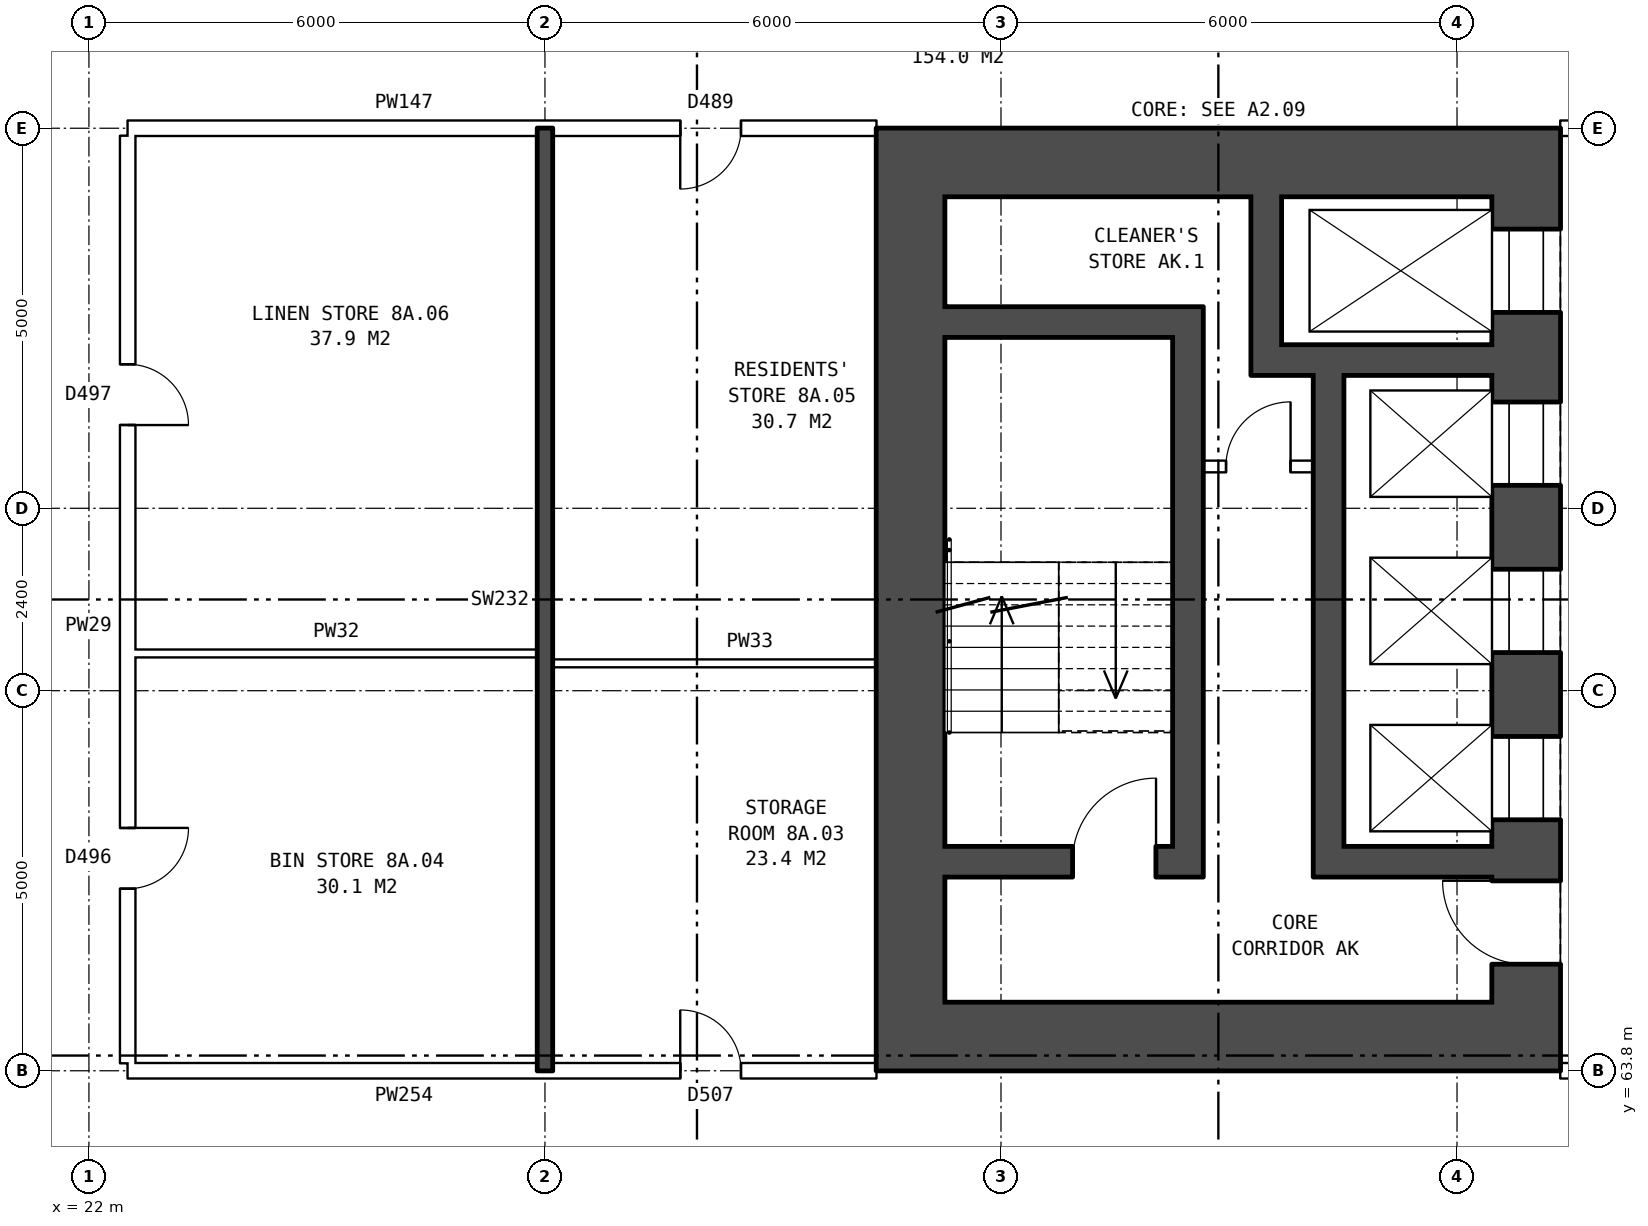
"""IFC4 building model, lengths in metres.
Left out: names, types, materials, properties, quantities, classifications, styles, units other than length and angle.
Written with IfcOpenShell. Run it as: python <this file> out.ifc"""

import sys

from ifc_helpers import new_model, si_unit, direction, frame, frame_2d, origin, place, context, subcontext, project, spatial, rectangle, extrude, element, fill, save


model = new_model("IFC4")
c1 = context("Model", 3, precision=1e-05, world=origin(), true_north=direction((0.0, 1.0)))
c2 = subcontext(c1, "Body", "Model", "MODEL_VIEW")
j1 = project(units=[si_unit("LENGTHUNIT", "METRE"), si_unit("PLANEANGLEUNIT", "RADIAN")], contexts=[c1])
p1 = place(None, origin())
s1 = spatial("IfcSite", under=j1, at=p1, CompositionType="ELEMENT")
p2 = place(p1, origin())
s2 = spatial("IfcBuilding", under=s1, at=p2, CompositionType="ELEMENT")
p3 = place(p2, frame((0.0, 0.0, 31.9)))
s3 = spatial("IfcBuildingStorey", under=s2, at=p3, CompositionType="ELEMENT", Elevation=31.9)
p4 = place(p3, frame((40.91, 75.3, 0.0), z_axis=(0.0, 0.0, 1.0), x_axis=(0.0, -1.0, 0.0)))
e1 = element("IfcWall", 1, at=p4, inside=s3, PredefinedType="SHEAR", context=c2, shape_type="SweptSolid", body=[
    extrude(rectangle(XDim=10.6, YDim=0.9, at=frame_2d((5.3, 0.0))), origin(), (0.0, 0.0, 1.0), 2.85),
])
p5 = place(p4, frame((0.425, 0.0, 0.0)))
e2 = element("IfcOpeningElement", 2, at=p5, cuts=e1, PredefinedType="OPENING", context=c2, shape_type="SweptSolid", body=[
    extrude(rectangle(XDim=1.1, YDim=2.1, at=frame_2d((0.55, 1.05))), frame((0.0, 0.46, 0.0), z_axis=(0.0, -1.0, 0.0), x_axis=(1.0, 0.0, 0.0)), (0.0, 0.0, 1.0), 0.92),
])
p6 = place(p4, frame((2.7, 0.0, 0.0)))
e3 = element("IfcOpeningElement", 3, at=p6, cuts=e1, PredefinedType="OPENING", context=c2, shape_type="SweptSolid", body=[
    extrude(rectangle(XDim=1.1, YDim=2.1, at=frame_2d((0.55, 1.05))), frame((0.0, 0.46, 0.0), z_axis=(0.0, -1.0, 0.0), x_axis=(1.0, 0.0, 0.0)), (0.0, 0.0, 1.0), 0.92),
])
p7 = place(p4, frame((4.9, 0.0, 0.0)))
e4 = element("IfcOpeningElement", 4, at=p7, cuts=e1, PredefinedType="OPENING", context=c2, shape_type="SweptSolid", body=[
    extrude(rectangle(XDim=1.1, YDim=2.1, at=frame_2d((0.55, 1.05))), frame((0.0, 0.46, 0.0), z_axis=(0.0, -1.0, 0.0), x_axis=(1.0, 0.0, 0.0)), (0.0, 0.0, 1.0), 0.92),
])
p8 = place(p4, frame((7.1, 0.0, 0.0)))
e5 = element("IfcOpeningElement", 5, at=p8, cuts=e1, PredefinedType="OPENING", context=c2, shape_type="SweptSolid", body=[
    extrude(rectangle(XDim=1.1, YDim=2.1, at=frame_2d((0.55, 1.05))), frame((0.0, 0.46, 0.0), z_axis=(0.0, -1.0, 0.0), x_axis=(1.0, 0.0, 0.0)), (0.0, 0.0, 1.0), 0.92),
])
p9 = place(p4, frame((9.0, 0.0, 0.0)))
e6 = element("IfcOpeningElement", 6, at=p9, cuts=e1, PredefinedType="OPENING", context=c2, shape_type="SweptSolid", body=[
    extrude(rectangle(XDim=1.1, YDim=2.1, at=frame_2d((0.55, 1.05))), frame((0.0, 0.46, 0.0), z_axis=(0.0, -1.0, 0.0), x_axis=(1.0, 0.0, 0.0)), (0.0, 0.0, 1.0), 0.92),
])
p10 = place(p3, frame((32.81, 75.3, 0.0), z_axis=(0.0, 0.0, 1.0), x_axis=(0.0, -1.0, 0.0)))
e7 = element("IfcWall", 7, at=p10, inside=s3, PredefinedType="SHEAR", context=c2, shape_type="SweptSolid", body=[
    extrude(rectangle(XDim=10.6, YDim=0.9, at=frame_2d((5.3, 0.0))), origin(), (0.0, 0.0, 1.0), 2.85),
])
for number, where, z_axis, x_axis in (
    (8, (41.36, 75.75, 0.0), (0.0, 0.0, 1.0), (-1.0, 0.0, 0.0)),
    (9, (41.36, 64.25, 0.0), (0.0, 0.0, 1.0), (-1.0, 0.0, 0.0)),
):
    element("IfcWall", number, at=place(p3, frame(where, z_axis=z_axis, x_axis=x_axis)), inside=s3, PredefinedType="SHEAR", context=c2, shape_type="SweptSolid", body=[
        extrude(rectangle(XDim=9.0, YDim=0.9, at=frame_2d((4.5, 0.0))), origin(), (0.0, 0.0, 1.0), 2.85),
    ])
p11 = place(p3, frame((36.26, 73.65, 0.0), z_axis=(0.0, 0.0, 1.0), x_axis=(-1.0, 0.0, 0.0)))
e10 = element("IfcWall", 10, at=p11, inside=s3, PredefinedType="SHEAR", context=c2, shape_type="SweptSolid", body=[
    extrude(rectangle(XDim=3.0, YDim=0.4, at=frame_2d((1.5, 0.0))), origin(), (0.0, 0.0, 1.0), 2.85),
])
p12 = place(p3, frame((40.46, 73.15, 0.0), z_axis=(0.0, 0.0, 1.0), x_axis=(-1.0, 0.0, 0.0)))
e11 = element("IfcWall", 11, at=p12, inside=s3, PredefinedType="SHEAR", context=c2, shape_type="SweptSolid", body=[
    extrude(rectangle(XDim=3.17, YDim=0.4, at=frame_2d((1.585, 0.0))), origin(), (0.0, 0.0, 1.0), 2.85),
])
p13 = place(p3, frame((38.11, 71.75, 0.0), z_axis=(0.0, 0.0, 1.0), x_axis=(-1.0, 0.0, 0.0)))
e12 = element("IfcWall", 12, at=p13, inside=s3, PredefinedType="PARTITIONING", context=c2, shape_type="SweptSolid", body=[
    extrude(rectangle(XDim=1.45, YDim=0.15, at=frame_2d((0.725, 0.0))), origin(), (0.0, 0.0, 1.0), 2.85),
])
p14 = place(p13, frame((0.3, 0.0, 0.0)))
e13 = element("IfcOpeningElement", 13, at=p14, cuts=e12, PredefinedType="OPENING", context=c2, shape_type="SweptSolid", body=[
    extrude(rectangle(XDim=0.85, YDim=2.1, at=frame_2d((0.425, 1.05))), frame((0.0, 0.085, 0.0), z_axis=(0.0, -1.0, 0.0), x_axis=(1.0, 0.0, 0.0)), (0.0, 0.0, 1.0), 0.17),
])
p15 = place(p3, frame((40.46, 66.55, 0.0), z_axis=(0.0, 0.0, 1.0), x_axis=(-1.0, 0.0, 0.0)))
e14 = element("IfcWall", 14, at=p15, inside=s3, PredefinedType="SHEAR", context=c2, shape_type="SweptSolid", body=[
    extrude(rectangle(XDim=1.95, YDim=0.4, at=frame_2d((0.975, 0.0))), origin(), (0.0, 0.0, 1.0), 2.85),
])
p16 = place(p3, frame((36.26, 66.55, 0.0), z_axis=(0.0, 0.0, 1.0), x_axis=(-1.0, 0.0, 0.0)))
e15 = element("IfcWall", 15, at=p16, inside=s3, PredefinedType="SHEAR", context=c2, shape_type="SweptSolid", body=[
    extrude(rectangle(XDim=3.0, YDim=0.4, at=frame_2d((1.5, 0.0))), origin(), (0.0, 0.0, 1.0), 2.85),
])
p17 = place(p16, frame((0.22, 0.0, 0.0)))
e16 = element("IfcOpeningElement", 16, at=p17, cuts=e15, PredefinedType="OPENING", context=c2, shape_type="SweptSolid", body=[
    extrude(rectangle(XDim=1.1, YDim=2.1, at=frame_2d((0.55, 1.05))), frame((0.0, 0.21, 0.0), z_axis=(0.0, -1.0, 0.0), x_axis=(1.0, 0.0, 0.0)), (0.0, 0.0, 1.0), 0.42),
])
p18 = place(p3, frame((38.31, 72.95, 0.0), z_axis=(0.0, 0.0, 1.0), x_axis=(0.0, -1.0, 0.0)))
e17 = element("IfcWall", 17, at=p18, inside=s3, PredefinedType="SHEAR", context=c2, shape_type="SweptSolid", body=[
    extrude(rectangle(XDim=6.6, YDim=0.4, at=frame_2d((3.3, 0.0))), origin(), (0.0, 0.0, 1.0), 2.85),
])
p19 = place(p3, frame((37.49, 75.3, 0.0), z_axis=(0.0, 0.0, 1.0), x_axis=(0.0, -1.0, 0.0)))
e18 = element("IfcWall", 18, at=p19, inside=s3, PredefinedType="SHEAR", context=c2, shape_type="SweptSolid", body=[
    extrude(rectangle(XDim=1.95, YDim=0.4, at=frame_2d((0.975, 0.0))), origin(), (0.0, 0.0, 1.0), 2.85),
])
p20 = place(p3, frame((36.46, 73.85, 0.0), z_axis=(0.0, 0.0, 1.0), x_axis=(0.0, -1.0, 0.0)))
e19 = element("IfcWall", 19, at=p20, inside=s3, PredefinedType="SHEAR", context=c2, shape_type="SweptSolid", body=[
    extrude(rectangle(XDim=7.5, YDim=0.4, at=frame_2d((3.75, 0.0))), origin(), (0.0, 0.0, 1.0), 2.85),
])
p21 = place(p3, frame((22.51, 63.8, 0.0), z_axis=(0.0, 0.0, 1.0), x_axis=(1.0, 0.0, 0.0)))
e20 = element("IfcWall", 20, at=p21, inside=s3, PredefinedType="PARTITIONING", context=c2, shape_type="SweptSolid", body=[
    extrude(rectangle(XDim=9.85, YDim=0.2, at=frame_2d((4.925, 0.0))), origin(), (0.0, 0.0, 1.0), 2.85),
])
p22 = place(p21, frame((7.27, 0.0, 0.0)))
e21 = element("IfcOpeningElement", 21, at=p22, cuts=e20, PredefinedType="OPENING", context=c2, shape_type="SweptSolid", body=[
    extrude(rectangle(XDim=0.8, YDim=2.1, at=frame_2d((0.4, 1.05))), frame((0.0, 0.11, 0.0), z_axis=(0.0, -1.0, 0.0), x_axis=(1.0, 0.0, 0.0)), (0.0, 0.0, 1.0), 0.22),
])
p23 = place(p3, frame((41.36, 63.8, 0.0), z_axis=(0.0, 0.0, 1.0), x_axis=(1.0, 0.0, 0.0)))
e22 = element("IfcWall", 22, at=p23, inside=s3, PredefinedType="PARTITIONING", context=c2, shape_type="SweptSolid", body=[
    extrude(rectangle(XDim=3.0, YDim=0.2, at=frame_2d((1.5, 0.0))), origin(), (0.0, 0.0, 1.0), 2.85),
])
p24 = place(p23, frame((1.0, 0.0, 0.0)))
e23 = element("IfcOpeningElement", 23, at=p24, cuts=e22, PredefinedType="OPENING", context=c2, shape_type="SweptSolid", body=[
    extrude(rectangle(XDim=1.0, YDim=2.1, at=frame_2d((0.5, 1.05))), frame((0.0, 0.11, 0.0), z_axis=(0.0, -1.0, 0.0), x_axis=(1.0, 0.0, 0.0)), (0.0, 0.0, 1.0), 0.22),
])
p25 = place(p3, frame((28.1, 69.16, 0.0), z_axis=(0.0, 0.0, 1.0), x_axis=(1.0, 0.0, 0.0)))
e24 = element("IfcWall", 24, at=p25, inside=s3, PredefinedType="PARTITIONING", context=c2, shape_type="SweptSolid", body=[
    extrude(rectangle(XDim=4.26, YDim=0.1, at=frame_2d((2.13, 0.0))), origin(), (0.0, 0.0, 1.0), 2.85),
])
p26 = place(p3, frame((22.61, 69.29, 0.0), z_axis=(0.0, 0.0, 1.0), x_axis=(1.0, 0.0, 0.0)))
e25 = element("IfcWall", 25, at=p26, inside=s3, PredefinedType="PARTITIONING", context=c2, shape_type="SweptSolid", body=[
    extrude(rectangle(XDim=5.29, YDim=0.1, at=frame_2d((2.645, 0.0))), origin(), (0.0, 0.0, 1.0), 2.85),
])
p27 = place(p3, frame((22.51, 76.2, 0.0), z_axis=(0.0, 0.0, 1.0), x_axis=(1.0, 0.0, 0.0)))
e26 = element("IfcWall", 26, at=p27, inside=s3, PredefinedType="PARTITIONING", context=c2, shape_type="SweptSolid", body=[
    extrude(rectangle(XDim=9.85, YDim=0.2, at=frame_2d((4.925, 0.0))), origin(), (0.0, 0.0, 1.0), 2.85),
])
p28 = place(p27, frame((7.27, 0.0, 0.0)))
e27 = element("IfcOpeningElement", 27, at=p28, cuts=e26, PredefinedType="OPENING", context=c2, shape_type="SweptSolid", body=[
    extrude(rectangle(XDim=0.8, YDim=2.1, at=frame_2d((0.4, 1.05))), frame((0.0, 0.11, 0.0), z_axis=(0.0, -1.0, 0.0), x_axis=(1.0, 0.0, 0.0)), (0.0, 0.0, 1.0), 0.22),
])
p29 = place(p3, frame((41.36, 76.2, 0.0), z_axis=(0.0, 0.0, 1.0), x_axis=(1.0, 0.0, 0.0)))
e28 = element("IfcWall", 28, at=p29, inside=s3, PredefinedType="PARTITIONING", context=c2, shape_type="SweptSolid", body=[
    extrude(rectangle(XDim=3.0, YDim=0.2, at=frame_2d((1.5, 0.0))), origin(), (0.0, 0.0, 1.0), 2.85),
])
p30 = place(p29, frame((1.0, 0.0, 0.0)))
e29 = element("IfcOpeningElement", 29, at=p30, cuts=e28, PredefinedType="OPENING", context=c2, shape_type="SweptSolid", body=[
    extrude(rectangle(XDim=1.0, YDim=2.1, at=frame_2d((0.5, 1.05))), frame((0.0, 0.11, 0.0), z_axis=(0.0, -1.0, 0.0), x_axis=(1.0, 0.0, 0.0)), (0.0, 0.0, 1.0), 0.22),
])
p31 = place(p3, frame((22.51, 63.9, 0.0), z_axis=(0.0, 0.0, 1.0), x_axis=(0.0, 1.0, 0.0)))
e30 = element("IfcWall", 30, at=p31, inside=s3, PredefinedType="PARTITIONING", context=c2, shape_type="SweptSolid", body=[
    extrude(rectangle(XDim=12.2, YDim=0.2, at=frame_2d((6.1, 0.0))), origin(), (0.0, 0.0, 1.0), 2.85),
])
p32 = place(p31, frame((2.295, 0.0, 0.0)))
e31 = element("IfcOpeningElement", 31, at=p32, cuts=e30, PredefinedType="OPENING", context=c2, shape_type="SweptSolid", body=[
    extrude(rectangle(XDim=0.8, YDim=2.1, at=frame_2d((0.4, 1.05))), frame((0.0, 0.11, 0.0), z_axis=(0.0, -1.0, 0.0), x_axis=(1.0, 0.0, 0.0)), (0.0, 0.0, 1.0), 0.22),
])
p33 = place(p31, frame((8.395, 0.0, 0.0)))
e32 = element("IfcOpeningElement", 32, at=p33, cuts=e30, PredefinedType="OPENING", context=c2, shape_type="SweptSolid", body=[
    extrude(rectangle(XDim=0.8, YDim=2.1, at=frame_2d((0.4, 1.05))), frame((0.0, 0.11, 0.0), z_axis=(0.0, -1.0, 0.0), x_axis=(1.0, 0.0, 0.0)), (0.0, 0.0, 1.0), 0.22),
])
p34 = place(p3, frame((28.0, 63.8, 0.0), z_axis=(0.0, 0.0, 1.0), x_axis=(0.0, 1.0, 0.0)))
e33 = element("IfcWall", 33, at=p34, inside=s3, PredefinedType="SOLIDWALL", context=c2, shape_type="SweptSolid", body=[
    extrude(rectangle(XDim=12.4, YDim=0.2, at=frame_2d((6.2, 0.0))), origin(), (0.0, 0.0, 1.0), 2.85),
])
p35 = place(p5, origin())
e34 = element("IfcDoor", 34, at=p35, inside=s3, OperationType="DOUBLE_DOOR_SLIDING", PredefinedType="DOOR", context=c2, shape_type="SweptSolid", body=[
    extrude(rectangle(XDim=1.1, YDim=2.1, at=frame_2d((0.55, 1.05))), frame((0.0, -0.385, 0.0), z_axis=(0.0, -1.0, 0.0), x_axis=(1.0, 0.0, 0.0)), (0.0, 0.0, 1.0), 0.05),
])
fill(e2, e34)
p36 = place(p6, origin())
e35 = element("IfcDoor", 35, at=p36, inside=s3, OperationType="DOUBLE_DOOR_SLIDING", PredefinedType="DOOR", context=c2, shape_type="SweptSolid", body=[
    extrude(rectangle(XDim=1.1, YDim=2.1, at=frame_2d((0.55, 1.05))), frame((0.0, -0.385, 0.0), z_axis=(0.0, -1.0, 0.0), x_axis=(1.0, 0.0, 0.0)), (0.0, 0.0, 1.0), 0.05),
])
fill(e3, e35)
p37 = place(p7, origin())
e36 = element("IfcDoor", 36, at=p37, inside=s3, OperationType="DOUBLE_DOOR_SLIDING", PredefinedType="DOOR", context=c2, shape_type="SweptSolid", body=[
    extrude(rectangle(XDim=1.1, YDim=2.1, at=frame_2d((0.55, 1.05))), frame((0.0, -0.385, 0.0), z_axis=(0.0, -1.0, 0.0), x_axis=(1.0, 0.0, 0.0)), (0.0, 0.0, 1.0), 0.05),
])
fill(e4, e36)
p38 = place(p8, origin())
e37 = element("IfcDoor", 37, at=p38, inside=s3, OperationType="DOUBLE_DOOR_SLIDING", PredefinedType="DOOR", context=c2, shape_type="SweptSolid", body=[
    extrude(rectangle(XDim=1.1, YDim=2.1, at=frame_2d((0.55, 1.05))), frame((0.0, -0.385, 0.0), z_axis=(0.0, -1.0, 0.0), x_axis=(1.0, 0.0, 0.0)), (0.0, 0.0, 1.0), 0.05),
])
fill(e5, e37)
p39 = place(p9, frame((1.1, 0.0, 0.0), z_axis=(0.0, 0.0, 1.0), x_axis=(-1.0, 0.0, 0.0)))
e38 = element("IfcDoor", 38, at=p39, inside=s3, OperationType="SINGLE_SWING_RIGHT", PredefinedType="DOOR", context=c2, shape_type="SweptSolid", body=[
    extrude(rectangle(XDim=1.1, YDim=2.1, at=frame_2d((0.55, 1.05))), frame((0.0, 0.435, 0.0), z_axis=(0.0, -1.0, 0.0), x_axis=(1.0, 0.0, 0.0)), (0.0, 0.0, 1.0), 0.05),
])
fill(e6, e38)
p40 = place(p17, frame((1.1, 0.0, 0.0), z_axis=(0.0, 0.0, 1.0), x_axis=(-1.0, 0.0, 0.0)))
e39 = element("IfcDoor", 39, at=p40, inside=s3, OperationType="SINGLE_SWING_RIGHT", PredefinedType="DOOR", context=c2, shape_type="SweptSolid", body=[
    extrude(rectangle(XDim=1.1, YDim=2.1, at=frame_2d((0.55, 1.05))), frame((0.0, 0.025, 0.0), z_axis=(0.0, -1.0, 0.0), x_axis=(1.0, 0.0, 0.0)), (0.0, 0.0, 1.0), 0.05),
])
fill(e16, e39)
p41 = place(p14, frame((0.85, 0.0, 0.0), z_axis=(0.0, 0.0, 1.0), x_axis=(-1.0, 0.0, 0.0)))
e40 = element("IfcDoor", 40, at=p41, inside=s3, OperationType="SINGLE_SWING_RIGHT", PredefinedType="DOOR", context=c2, shape_type="SweptSolid", body=[
    extrude(rectangle(XDim=0.85, YDim=2.1, at=frame_2d((0.425, 1.05))), frame((0.0, 0.025, 0.0), z_axis=(0.0, -1.0, 0.0), x_axis=(1.0, 0.0, 0.0)), (0.0, 0.0, 1.0), 0.05),
])
fill(e13, e40)
p42 = place(p22, origin())
e41 = element("IfcDoor", 41, at=p42, inside=s3, OperationType="SINGLE_SWING_LEFT", PredefinedType="DOOR", context=c2, shape_type="SweptSolid", body=[
    extrude(rectangle(XDim=0.8, YDim=2.1, at=frame_2d((0.4, 1.05))), frame((0.0, 0.025, 0.0), z_axis=(0.0, -1.0, 0.0), x_axis=(1.0, 0.0, 0.0)), (0.0, 0.0, 1.0), 0.05),
])
fill(e21, e41)
p43 = place(p32, frame((0.8, 0.0, 0.0), z_axis=(0.0, 0.0, 1.0), x_axis=(-1.0, 0.0, 0.0)))
e42 = element("IfcDoor", 42, at=p43, inside=s3, OperationType="SINGLE_SWING_LEFT", PredefinedType="DOOR", context=c2, shape_type="SweptSolid", body=[
    extrude(rectangle(XDim=0.8, YDim=2.1, at=frame_2d((0.4, 1.05))), frame((0.0, 0.025, 0.0), z_axis=(0.0, -1.0, 0.0), x_axis=(1.0, 0.0, 0.0)), (0.0, 0.0, 1.0), 0.05),
])
fill(e31, e42)
p44 = place(p28, frame((0.8, 0.0, 0.0), z_axis=(0.0, 0.0, 1.0), x_axis=(-1.0, 0.0, 0.0)))
e43 = element("IfcDoor", 43, at=p44, inside=s3, OperationType="SINGLE_SWING_RIGHT", PredefinedType="DOOR", context=c2, shape_type="SweptSolid", body=[
    extrude(rectangle(XDim=0.8, YDim=2.1, at=frame_2d((0.4, 1.05))), frame((0.0, 0.025, 0.0), z_axis=(0.0, -1.0, 0.0), x_axis=(1.0, 0.0, 0.0)), (0.0, 0.0, 1.0), 0.05),
])
fill(e27, e43)
p45 = place(p33, frame((0.8, 0.0, 0.0), z_axis=(0.0, 0.0, 1.0), x_axis=(-1.0, 0.0, 0.0)))
e44 = element("IfcDoor", 44, at=p45, inside=s3, OperationType="SINGLE_SWING_RIGHT", PredefinedType="DOOR", context=c2, shape_type="SweptSolid", body=[
    extrude(rectangle(XDim=0.8, YDim=2.1, at=frame_2d((0.4, 1.05))), frame((0.0, 0.025, 0.0), z_axis=(0.0, -1.0, 0.0), x_axis=(1.0, 0.0, 0.0)), (0.0, 0.0, 1.0), 0.05),
])
fill(e32, e44)
save(model, sys.argv[1])
